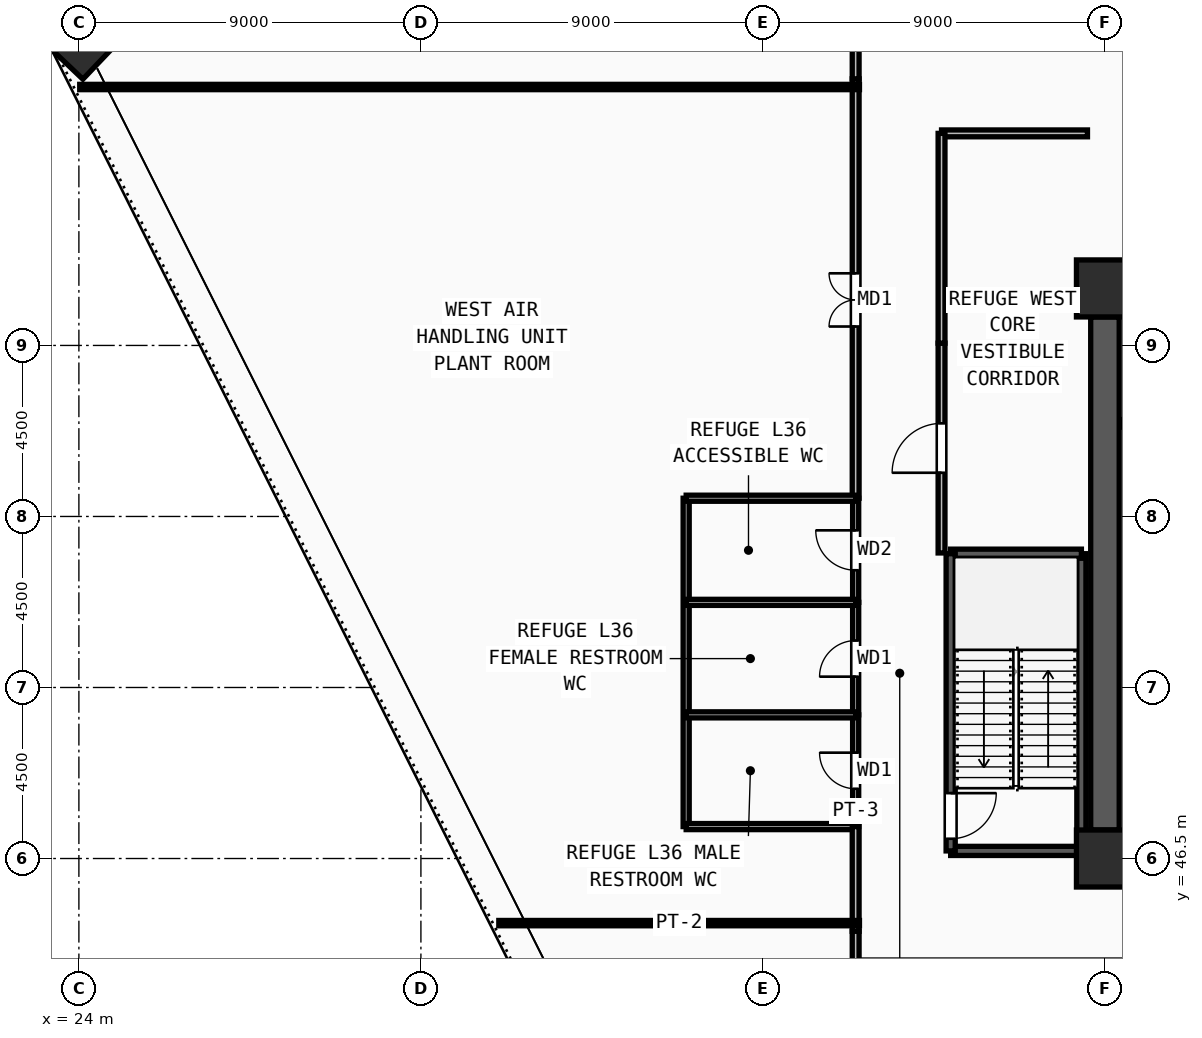
"""IFC4 building model, lengths in metres.
Left out: names, types, materials, properties, quantities, classifications, styles, units other than length and angle.
Written with IfcOpenShell. Run it as: python <this file> out.ifc"""

import sys

from ifc_helpers import new_model, si_unit, direction, frame, frame_2d, origin, origin_2d, place, context, subcontext, project, spatial, rectangle, extrude, source, transform, mapped, element, fill, save


model = new_model("IFC4")
c1 = context("Model", 3, precision=1e-05, world=origin(), true_north=direction((0.0, 1.0)))
c2 = subcontext(c1, "Body", "Model", "MODEL_VIEW")
j1 = project(units=[si_unit("LENGTHUNIT", "METRE"), si_unit("PLANEANGLEUNIT", "RADIAN")], contexts=[c1])
p1 = place(None, origin())
s1 = spatial("IfcSite", under=j1, at=p1, CompositionType="ELEMENT")
p2 = place(p1, origin())
s2 = spatial("IfcBuilding", under=s1, at=p2, CompositionType="ELEMENT")
p3 = place(p2, frame((0.0, 0.0, 139.5)))
s3 = spatial("IfcBuildingStorey", under=s2, at=p3, CompositionType="ELEMENT", Elevation=139.5)
m1 = source(origin(), c2, "Body", "SweptSolid", [
    extrude(rectangle(XDim=1.5, YDim=1.5, at=origin_2d()), origin(), (0.0, 0.0, 1.0), 4.5),
])
for number, where, z_axis, x_axis in (
    (1, (51.0, 46.5, 0.0), (0.0, 0.0, 1.0), (1.0, 0.0, 0.0)),
    (2, (51.0, 61.5, 0.0), (0.0, 0.0, 1.0), (1.0, 0.0, 0.0)),
):
    element("IfcColumn", number, at=place(p3, frame(where, z_axis=z_axis, x_axis=x_axis)), inside=s3, PredefinedType="COLUMN", context=c2, shape_type="MappedRepresentation", body=[
        mapped(m1, transform((0.0, 0.0, 0.0), x_axis=(1.0, 0.0, 0.0), y_axis=(0.0, 1.0, 0.0), z_axis=(0.0, 0.0, 1.0), scale=1.0)),
    ])
m2 = source(origin(), c2, "Body", "SweptSolid", [
    extrude(rectangle(XDim=1.4, YDim=1.15, at=origin_2d()), origin(), (0.0, 0.0, 1.0), 4.5),
])
p4 = place(p3, frame((24.171, 67.909, 0.0), z_axis=(0.0, 0.0, 1.0), x_axis=(0.68936671806, 0.724412539946, 0.0)))
e3 = element("IfcColumn", 3, at=p4, inside=s3, PredefinedType="COLUMN", context=c2, shape_type="MappedRepresentation", body=[
    mapped(m2, transform((0.0, 0.0, 0.0), x_axis=(1.0, 0.0, 0.0), y_axis=(0.0, 1.0, 0.0), z_axis=(0.0, 0.0, 1.0), scale=1.0)),
])
p5 = place(p3, frame((51.0, 47.25, 0.0), z_axis=(0.0, 0.0, 1.0), x_axis=(0.0, 1.0, 0.0)))
e4 = element("IfcWall", 4, at=p5, inside=s3, PredefinedType="SHEAR", context=c2, shape_type="SweptSolid", body=[
    extrude(rectangle(XDim=13.5, YDim=0.75, at=frame_2d((6.75, 0.0))), origin(), (0.0, 0.0, 1.0), 4.32),
])
p6 = place(p3, frame((46.94, 46.7, 0.0), z_axis=(0.0, 0.0, 1.0), x_axis=(1.0, 0.0, 0.0)))
e5 = element("IfcWall", 5, at=p6, inside=s3, PredefinedType="SOLIDWALL", context=c2, shape_type="SweptSolid", body=[
    extrude(rectangle(XDim=3.44, YDim=0.24, at=frame_2d((1.72, 0.0))), origin(), (0.0, 0.0, 1.0), 4.32),
])
p7 = place(p3, frame((50.38, 46.7, 0.0), z_axis=(0.0, 0.0, 1.0), x_axis=(0.0, 1.0, 0.0)))
e6 = element("IfcWall", 6, at=p7, inside=s3, PredefinedType="SOLIDWALL", context=c2, shape_type="SweptSolid", body=[
    extrude(rectangle(XDim=7.82, YDim=0.24, at=frame_2d((3.91, 0.0))), origin(), (0.0, 0.0, 1.0), 4.32),
])
p8 = place(p3, frame((50.38, 54.52, 0.0), z_axis=(0.0, 0.0, 1.0), x_axis=(-1.0, 0.0, 0.0)))
e7 = element("IfcWall", 7, at=p8, inside=s3, PredefinedType="SOLIDWALL", context=c2, shape_type="SweptSolid", body=[
    extrude(rectangle(XDim=3.44, YDim=0.24, at=frame_2d((1.72, 0.0))), origin(), (0.0, 0.0, 1.0), 4.32),
])
p9 = place(p3, frame((46.94, 54.52, 0.0), z_axis=(0.0, 0.0, 1.0), x_axis=(0.0, -1.0, 0.0)))
e8 = element("IfcWall", 8, at=p9, inside=s3, PredefinedType="SOLIDWALL", context=c2, shape_type="SweptSolid", body=[
    extrude(rectangle(XDim=7.82, YDim=0.24, at=frame_2d((3.91, 0.0))), origin(), (0.0, 0.0, 1.0), 4.32),
])
m3 = source(origin(), c2, "Body", "SweptSolid", [
    extrude(rectangle(XDim=1.2, YDim=2.2, at=frame_2d((0.6, 1.1))), frame((0.0, 0.13, 0.0), z_axis=(0.0, -1.0, 0.0), x_axis=(1.0, 0.0, 0.0)), (0.0, 0.0, 1.0), 0.26),
])
p10 = place(p9, frame((6.3, 0.0, 0.0)))
e9 = element("IfcOpeningElement", 9, at=p10, cuts=e8, PredefinedType="OPENING", context=c2, shape_type="MappedRepresentation", body=[
    mapped(m3, transform((0.0, 0.0, 0.0), x_axis=(1.0, 0.0, 0.0), y_axis=(0.0, 1.0, 0.0), z_axis=(0.0, 0.0, 1.0), scale=1.0)),
])
for number, where, z_axis, x_axis in (
    (10, (51.4, 57.95, 0.0), (0.0, 0.0, 1.0), (1.0, 0.0, 0.0)),
    (11, (53.8, 60.88, 0.0), (0.0, 0.0, 1.0), (-1.0, 0.0, 0.0)),
):
    element("IfcWall", number, at=place(p3, frame(where, z_axis=z_axis, x_axis=x_axis)), inside=s3, PredefinedType="SOLIDWALL", context=c2, shape_type="SweptSolid", body=[
        extrude(rectangle(XDim=2.4, YDim=0.2, at=frame_2d((1.2, 0.0))), origin(), (0.0, 0.0, 1.0), 4.32),
    ])
p11 = place(p3, frame((44.44, 47.34, 0.0), z_axis=(0.0, 0.0, 1.0), x_axis=(0.0, 1.0, 0.0)))
e12 = element("IfcWall", 12, at=p11, inside=s3, PredefinedType="PARTITIONING", context=c2, shape_type="SweptSolid", body=[
    extrude(rectangle(XDim=2.94, YDim=0.16, at=frame_2d((1.47, 0.0))), origin(), (0.0, 0.0, 1.0), 4.32),
])
m4 = source(origin(), c2, "Body", "SweptSolid", [
    extrude(rectangle(XDim=0.95, YDim=2.15, at=frame_2d((0.475, 1.075))), frame((0.0, 0.09, 0.0), z_axis=(0.0, -1.0, 0.0), x_axis=(1.0, 0.0, 0.0)), (0.0, 0.0, 1.0), 0.18),
])
p12 = place(p11, frame((0.995, 0.0, 0.0)))
e13 = element("IfcOpeningElement", 13, at=p12, cuts=e12, PredefinedType="OPENING", context=c2, shape_type="MappedRepresentation", body=[
    mapped(m4, transform((0.0, 0.0, 0.0), x_axis=(1.0, 0.0, 0.0), y_axis=(0.0, 1.0, 0.0), z_axis=(0.0, 0.0, 1.0), scale=1.0)),
])
p13 = place(p3, frame((44.44, 50.28, 0.0), z_axis=(0.0, 0.0, 1.0), x_axis=(0.0, 1.0, 0.0)))
e14 = element("IfcWall", 14, at=p13, inside=s3, PredefinedType="PARTITIONING", context=c2, shape_type="SweptSolid", body=[
    extrude(rectangle(XDim=2.96, YDim=0.16, at=frame_2d((1.48, 0.0))), origin(), (0.0, 0.0, 1.0), 4.32),
])
p14 = place(p13, frame((1.005, 0.0, 0.0)))
e15 = element("IfcOpeningElement", 15, at=p14, cuts=e14, PredefinedType="OPENING", context=c2, shape_type="MappedRepresentation", body=[
    mapped(m4, transform((0.0, 0.0, 0.0), x_axis=(1.0, 0.0, 0.0), y_axis=(0.0, 1.0, 0.0), z_axis=(0.0, 0.0, 1.0), scale=1.0)),
])
p15 = place(p3, frame((44.44, 53.24, 0.0), z_axis=(0.0, 0.0, 1.0), x_axis=(0.0, 1.0, 0.0)))
e16 = element("IfcWall", 16, at=p15, inside=s3, PredefinedType="PARTITIONING", context=c2, shape_type="SweptSolid", body=[
    extrude(rectangle(XDim=2.74, YDim=0.16, at=frame_2d((1.37, 0.0))), origin(), (0.0, 0.0, 1.0), 4.32),
])
m5 = source(origin(), c2, "Body", "SweptSolid", [
    extrude(rectangle(XDim=1.05, YDim=2.15, at=frame_2d((0.525, 1.075))), frame((0.0, 0.09, 0.0), z_axis=(0.0, -1.0, 0.0), x_axis=(1.0, 0.0, 0.0)), (0.0, 0.0, 1.0), 0.18),
])
p16 = place(p15, frame((0.845, 0.0, 0.0)))
e17 = element("IfcOpeningElement", 17, at=p16, cuts=e16, PredefinedType="OPENING", context=c2, shape_type="MappedRepresentation", body=[
    mapped(m5, transform((0.0, 0.0, 0.0), x_axis=(1.0, 0.0, 0.0), y_axis=(0.0, 1.0, 0.0), z_axis=(0.0, 0.0, 1.0), scale=1.0)),
])
p17 = place(p3, frame((46.7, 54.54, 0.0), z_axis=(0.0, 0.0, 1.0), x_axis=(0.0, 1.0, 0.0)))
e18 = element("IfcWall", 18, at=p17, inside=s3, PredefinedType="PARTITIONING", context=c2, shape_type="SweptSolid", body=[
    extrude(rectangle(XDim=5.52, YDim=0.18, at=frame_2d((2.76, 0.0))), origin(), (0.0, 0.0, 1.0), 4.32),
])
m6 = source(origin(), c2, "Body", "SweptSolid", [
    extrude(rectangle(XDim=1.3, YDim=2.2, at=frame_2d((0.65, 1.1))), frame((0.0, 0.1, 0.0), z_axis=(0.0, -1.0, 0.0), x_axis=(1.0, 0.0, 0.0)), (0.0, 0.0, 1.0), 0.2),
])
p18 = place(p17, frame((2.11, 0.0, 0.0)))
e19 = element("IfcOpeningElement", 19, at=p18, cuts=e18, PredefinedType="OPENING", context=c2, shape_type="MappedRepresentation", body=[
    mapped(m6, transform((0.0, 0.0, 0.0), x_axis=(1.0, 0.0, 0.0), y_axis=(0.0, 1.0, 0.0), z_axis=(0.0, 0.0, 1.0), scale=1.0)),
])
p19 = place(p3, frame((44.44, 55.98, 0.0), z_axis=(0.0, 0.0, 1.0), x_axis=(0.0, 1.0, 0.0)))
e20 = element("IfcWall", 20, at=p19, inside=s3, PredefinedType="PARTITIONING", context=c2, shape_type="SweptSolid", body=[
    extrude(rectangle(XDim=11.035, YDim=0.18, at=frame_2d((5.518, 0.0))), origin(), (0.0, 0.0, 1.0), 4.32),
])
m7 = source(origin(), c2, "Body", "SweptSolid", [
    extrude(rectangle(XDim=1.4, YDim=2.25, at=frame_2d((0.7, 1.125))), frame((0.0, 0.1, 0.0), z_axis=(0.0, -1.0, 0.0), x_axis=(1.0, 0.0, 0.0)), (0.0, 0.0, 1.0), 0.2),
])
p20 = place(p19, frame((4.518, 0.0, 0.0)))
e21 = element("IfcOpeningElement", 21, at=p20, cuts=e20, PredefinedType="OPENING", context=c2, shape_type="MappedRepresentation", body=[
    mapped(m7, transform((0.0, 0.0, 0.0), x_axis=(1.0, 0.0, 0.0), y_axis=(0.0, 1.0, 0.0), z_axis=(0.0, 0.0, 1.0), scale=1.0)),
])
p21 = place(p3, frame((39.98, 47.34, 0.0), z_axis=(0.0, 0.0, 1.0), x_axis=(0.0, 1.0, 0.0)))
e22 = element("IfcWall", 22, at=p21, inside=s3, PredefinedType="PARTITIONING", context=c2, shape_type="SweptSolid", body=[
    extrude(rectangle(XDim=8.64, YDim=0.16, at=frame_2d((4.32, 0.0))), origin(), (0.0, 0.0, 1.0), 4.32),
])
for number, where, z_axis, x_axis in (
    (23, (39.98, 47.34, 0.0), (0.0, 0.0, 1.0), (1.0, 0.0, 0.0)),
    (24, (39.98, 50.28, 0.0), (0.0, 0.0, 1.0), (1.0, 0.0, 0.0)),
    (25, (39.98, 53.24, 0.0), (0.0, 0.0, 1.0), (1.0, 0.0, 0.0)),
    (26, (39.98, 55.98, 0.0), (0.0, 0.0, 1.0), (1.0, 0.0, 0.0)),
):
    element("IfcWall", number, at=place(p3, frame(where, z_axis=z_axis, x_axis=x_axis)), inside=s3, PredefinedType="PARTITIONING", context=c2, shape_type="SweptSolid", body=[
        extrude(rectangle(XDim=4.46, YDim=0.16, at=frame_2d((2.23, 0.0))), origin(), (0.0, 0.0, 1.0), 4.32),
    ])
p22 = place(p3, frame((46.7, 65.58, 0.0), z_axis=(0.0, 0.0, 1.0), x_axis=(1.0, 0.0, 0.0)))
e27 = element("IfcWall", 27, at=p22, inside=s3, PredefinedType="PARTITIONING", context=c2, shape_type="SweptSolid", body=[
    extrude(rectangle(XDim=3.84, YDim=0.18, at=frame_2d((1.92, 0.0))), origin(), (0.0, 0.0, 1.0), 4.32),
])
p23 = place(p3, frame((46.7, 60.06, 0.0), z_axis=(0.0, 0.0, 1.0), x_axis=(0.0, 1.0, 0.0)))
e28 = element("IfcWall", 28, at=p23, inside=s3, PredefinedType="PARTITIONING", context=c2, shape_type="SweptSolid", body=[
    extrude(rectangle(XDim=5.52, YDim=0.18, at=frame_2d((2.76, 0.0))), origin(), (0.0, 0.0, 1.0), 4.32),
])
p24 = place(p3, frame((44.44, 67.015, 0.0), z_axis=(0.0, 0.0, 1.0), x_axis=(0.0, 1.0, 0.0)))
e29 = element("IfcWall", 29, at=p24, inside=s3, PredefinedType="PARTITIONING", context=c2, shape_type="SweptSolid", body=[
    extrude(rectangle(XDim=0.965, YDim=0.18, at=frame_2d((0.482, 0.0))), origin(), (0.0, 0.0, 1.0), 4.32),
])
p25 = place(p3, frame((44.44, 44.585, 0.0), z_axis=(0.0, 0.0, 1.0), x_axis=(0.0, 1.0, 0.0)))
e30 = element("IfcWall", 30, at=p25, inside=s3, PredefinedType="PARTITIONING", context=c2, shape_type="SweptSolid", body=[
    extrude(rectangle(XDim=2.755, YDim=0.18, at=frame_2d((1.377, 0.0))), origin(), (0.0, 0.0, 1.0), 4.32),
])
p26 = place(p3, frame((44.44, 43.67, 0.0), z_axis=(0.0, 0.0, 1.0), x_axis=(0.0, 1.0, 0.0)))
e31 = element("IfcWall", 31, at=p26, inside=s3, PredefinedType="PARTITIONING", context=c2, shape_type="SweptSolid", body=[
    extrude(rectangle(XDim=0.915, YDim=0.18, at=frame_2d((0.458, 0.0))), origin(), (0.0, 0.0, 1.0), 4.32),
])
p27 = place(p3, frame((44.54, 44.8, 0.0), z_axis=(0.0, 0.0, 1.0), x_axis=(-1.0, 0.0, 0.0)))
e32 = element("IfcWall", 32, at=p27, inside=s3, PredefinedType="PARTITIONING", context=c2, shape_type="SweptSolid", body=[
    extrude(rectangle(XDim=9.49, YDim=0.14, at=frame_2d((4.745, 0.0))), origin(), (0.0, 0.0, 1.0), 4.32),
])
p28 = place(p3, frame((44.54, 66.8, 0.0), z_axis=(0.0, 0.0, 1.0), x_axis=(-1.0, 0.0, 0.0)))
e33 = element("IfcWall", 33, at=p28, inside=s3, PredefinedType="PARTITIONING", context=c2, shape_type="SweptSolid", body=[
    extrude(rectangle(XDim=20.518, YDim=0.14, at=frame_2d((10.259, 0.0))), origin(), (0.0, 0.0, 1.0), 3.505),
])
m8 = source(origin(), c2, "Body", "SweptSolid", [
    extrude(rectangle(XDim=1.2, YDim=2.2, at=frame_2d((0.6, 1.1))), frame((0.0, 0.025, 0.0), z_axis=(0.0, -1.0, 0.0), x_axis=(1.0, 0.0, 0.0)), (0.0, 0.0, 1.0), 0.05),
])
p29 = place(p10, origin())
e34 = element("IfcDoor", 34, at=p29, inside=s3, OperationType="SINGLE_SWING_LEFT", PredefinedType="DOOR", context=c2, shape_type="MappedRepresentation", body=[
    mapped(m8, transform((0.0, 0.0, 0.0), x_axis=(1.0, 0.0, 0.0), y_axis=(0.0, 1.0, 0.0), z_axis=(0.0, 0.0, 1.0), scale=1.0)),
])
fill(e9, e34)
m9 = source(origin(), c2, "Body", "SweptSolid", [
    extrude(rectangle(XDim=0.95, YDim=2.15, at=frame_2d((0.475, 1.075))), frame((0.0, 0.025, 0.0), z_axis=(0.0, -1.0, 0.0), x_axis=(1.0, 0.0, 0.0)), (0.0, 0.0, 1.0), 0.05),
])
p30 = place(p12, origin())
e35 = element("IfcDoor", 35, at=p30, inside=s3, OperationType="SINGLE_SWING_RIGHT", PredefinedType="DOOR", context=c2, shape_type="MappedRepresentation", body=[
    mapped(m9, transform((0.0, 0.0, 0.0), x_axis=(1.0, 0.0, 0.0), y_axis=(0.0, 1.0, 0.0), z_axis=(0.0, 0.0, 1.0), scale=1.0)),
])
fill(e13, e35)
p31 = place(p14, origin())
e36 = element("IfcDoor", 36, at=p31, inside=s3, OperationType="SINGLE_SWING_LEFT", PredefinedType="DOOR", context=c2, shape_type="MappedRepresentation", body=[
    mapped(m9, transform((0.0, 0.0, 0.0), x_axis=(1.0, 0.0, 0.0), y_axis=(0.0, 1.0, 0.0), z_axis=(0.0, 0.0, 1.0), scale=1.0)),
])
fill(e15, e36)
m10 = source(origin(), c2, "Body", "SweptSolid", [
    extrude(rectangle(XDim=1.05, YDim=2.15, at=frame_2d((0.525, 1.075))), frame((0.0, 0.025, 0.0), z_axis=(0.0, -1.0, 0.0), x_axis=(1.0, 0.0, 0.0)), (0.0, 0.0, 1.0), 0.05),
])
p32 = place(p16, origin())
e37 = element("IfcDoor", 37, at=p32, inside=s3, OperationType="SINGLE_SWING_RIGHT", PredefinedType="DOOR", context=c2, shape_type="MappedRepresentation", body=[
    mapped(m10, transform((0.0, 0.0, 0.0), x_axis=(1.0, 0.0, 0.0), y_axis=(0.0, 1.0, 0.0), z_axis=(0.0, 0.0, 1.0), scale=1.0)),
])
fill(e17, e37)
m11 = source(origin(), c2, "Body", "SweptSolid", [
    extrude(rectangle(XDim=1.3, YDim=2.2, at=frame_2d((0.65, 1.1))), frame((0.0, 0.025, 0.0), z_axis=(0.0, -1.0, 0.0), x_axis=(1.0, 0.0, 0.0)), (0.0, 0.0, 1.0), 0.05),
])
p33 = place(p18, origin())
e38 = element("IfcDoor", 38, at=p33, inside=s3, OperationType="SINGLE_SWING_LEFT", PredefinedType="DOOR", context=c2, shape_type="MappedRepresentation", body=[
    mapped(m11, transform((0.0, 0.0, 0.0), x_axis=(1.0, 0.0, 0.0), y_axis=(0.0, 1.0, 0.0), z_axis=(0.0, 0.0, 1.0), scale=1.0)),
])
fill(e19, e38)
m12 = source(origin(), c2, "Body", "SweptSolid", [
    extrude(rectangle(XDim=1.4, YDim=2.25, at=frame_2d((0.7, 1.125))), frame((0.0, 0.025, 0.0), z_axis=(0.0, -1.0, 0.0), x_axis=(1.0, 0.0, 0.0)), (0.0, 0.0, 1.0), 0.05),
])
p34 = place(p20, origin())
e39 = element("IfcDoor", 39, at=p34, inside=s3, OperationType="DOUBLE_DOOR_SINGLE_SWING", PredefinedType="DOOR", context=c2, shape_type="MappedRepresentation", body=[
    mapped(m12, transform((0.0, 0.0, 0.0), x_axis=(1.0, 0.0, 0.0), y_axis=(0.0, 1.0, 0.0), z_axis=(0.0, 0.0, 1.0), scale=1.0)),
])
fill(e21, e39)
save(model, sys.argv[1])
